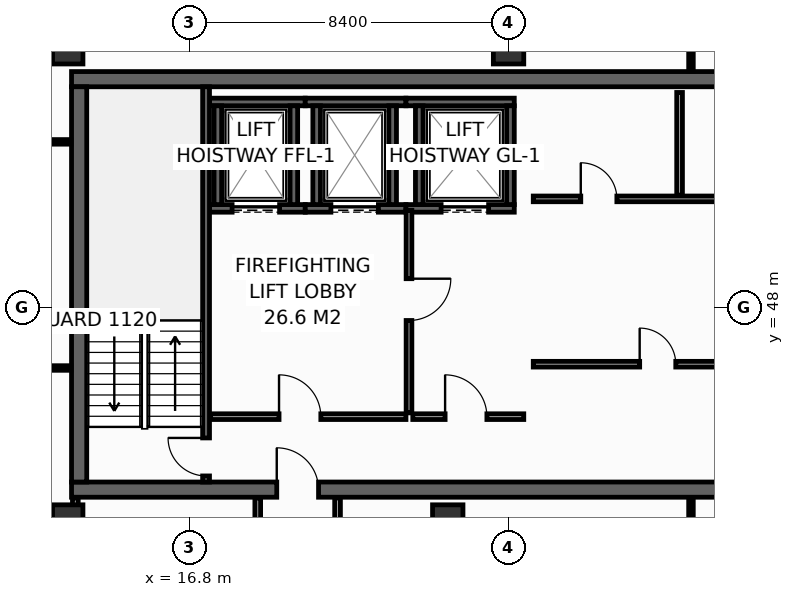
"""IFC4 building model, lengths in metres.
Left out: names, types, materials, properties, quantities, classifications, styles, units other than length and angle.
Written with IfcOpenShell. Run it as: python <this file> out.ifc"""

import sys

from ifc_helpers import new_model, si_unit, direction, frame, frame_2d, origin, origin_2d, place, context, subcontext, project, spatial, rectangle, hollow_rectangle, extrude, element, fill, save


model = new_model("IFC4")
c1 = context("Model", 3, precision=1e-05, world=origin(), true_north=direction((0.0, 1.0)))
c2 = subcontext(c1, "Body", "Model", "MODEL_VIEW")
j1 = project(units=[si_unit("LENGTHUNIT", "METRE"), si_unit("PLANEANGLEUNIT", "RADIAN")], contexts=[c1])
p1 = place(None, origin())
s1 = spatial("IfcSite", under=j1, at=p1, CompositionType="ELEMENT")
p2 = place(p1, origin())
s2 = spatial("IfcBuilding", under=s1, at=p2, CompositionType="ELEMENT")
p3 = place(p2, frame((0.0, 0.0, 230.6)))
s3 = spatial("IfcBuildingStorey", under=s2, at=p3, CompositionType="ELEMENT", Elevation=230.6)
p4 = place(p3, frame((13.7, 43.2, 0.0), z_axis=(0.0, 0.0, 1.0), x_axis=(1.0, 0.0, 0.0)))
e1 = element("IfcWall", 1, at=p4, inside=s3, PredefinedType="SHEAR", context=c2, shape_type="SweptSolid", body=[
    extrude(rectangle(XDim=32.5, YDim=0.4, at=frame_2d((16.25, 0.0))), origin(), (0.0, 0.0, 1.0), 3.55),
])
p5 = place(p4, frame((5.4, 0.0, 0.0)))
e2 = element("IfcOpeningElement", 2, at=p5, cuts=e1, PredefinedType="OPENING", context=c2, shape_type="SweptSolid", body=[
    extrude(rectangle(XDim=1.1, YDim=2.15, at=frame_2d((0.55, 1.075))), frame((0.0, 0.21, 0.0), z_axis=(0.0, -1.0, 0.0), x_axis=(1.0, 0.0, 0.0)), (0.0, 0.0, 1.0), 0.42),
])
p6 = place(p4, frame((25.6, 0.0, 0.0)))
e3 = element("IfcOpeningElement", 3, at=p6, cuts=e1, PredefinedType="OPENING", context=c2, shape_type="SweptSolid", body=[
    extrude(rectangle(XDim=1.1, YDim=2.15, at=frame_2d((0.55, 1.075))), frame((0.0, 0.21, 0.0), z_axis=(0.0, -1.0, 0.0), x_axis=(1.0, 0.0, 0.0)), (0.0, 0.0, 1.0), 0.42),
])
p7 = place(p3, frame((13.7, 54.0, 0.0), z_axis=(0.0, 0.0, 1.0), x_axis=(1.0, 0.0, 0.0)))
e4 = element("IfcWall", 4, at=p7, inside=s3, PredefinedType="SHEAR", context=c2, shape_type="SweptSolid", body=[
    extrude(rectangle(XDim=32.5, YDim=0.4, at=frame_2d((16.25, 0.0))), origin(), (0.0, 0.0, 1.0), 3.55),
])
p8 = place(p3, frame((13.9, 43.4, 0.0), z_axis=(0.0, 0.0, 1.0), x_axis=(0.0, 1.0, 0.0)))
e5 = element("IfcWall", 5, at=p8, inside=s3, PredefinedType="SHEAR", context=c2, shape_type="SweptSolid", body=[
    extrude(rectangle(XDim=10.4, YDim=0.4, at=frame_2d((5.2, 0.0))), origin(), (0.0, 0.0, 1.0), 3.55),
])
for number, where, z_axis, x_axis in (
    (6, (13.6, 54.8, 0.0), (0.0, 0.0, 1.0), (1.0, 0.0, 0.0)),
    (7, (25.2, 54.8, 0.0), (0.0, 0.0, 1.0), (1.0, 0.0, 0.0)),
    (8, (13.6, 42.4, 0.0), (0.0, 0.0, 1.0), (1.0, 0.0, 0.0)),
    (9, (23.6, 42.4, 0.0), (0.0, 0.0, 1.0), (1.0, 0.0, 0.0)),
):
    element("IfcColumn", number, at=place(p3, frame(where, z_axis=z_axis, x_axis=x_axis)), inside=s3, PredefinedType="COLUMN", context=c2, shape_type="SweptSolid", body=[
        extrude(hollow_rectangle(XDim=0.8, YDim=0.8, WallThickness=0.036, at=origin_2d()), origin(), (0.0, 0.0, 1.0), 3.8),
    ])
p9 = place(p3, frame((17.33, 50.6, 0.0), z_axis=(0.0, 0.0, 1.0), x_axis=(1.0, 0.0, 0.0)))
e10 = element("IfcWall", 10, at=p9, inside=s3, PredefinedType="SHEAR", context=c2, shape_type="SweptSolid", body=[
    extrude(rectangle(XDim=2.52, YDim=0.2, at=frame_2d((1.26, 0.0))), origin(), (0.0, 0.0, 1.0), 3.55),
])
p10 = place(p9, frame((0.595, 0.0, 0.0)))
e11 = element("IfcOpeningElement", 11, at=p10, cuts=e10, PredefinedType="OPENING", context=c2, shape_type="SweptSolid", body=[
    extrude(rectangle(XDim=1.25, YDim=2.3, at=frame_2d((0.625, 1.15))), frame((0.0, 0.11, 0.0), z_axis=(0.0, -1.0, 0.0), x_axis=(1.0, 0.0, 0.0)), (0.0, 0.0, 1.0), 0.22),
])
p11 = place(p3, frame((17.33, 53.4, 0.0), z_axis=(0.0, 0.0, 1.0), x_axis=(1.0, 0.0, 0.0)))
e12 = element("IfcWall", 12, at=p11, inside=s3, PredefinedType="SHEAR", context=c2, shape_type="SweptSolid", body=[
    extrude(rectangle(XDim=2.52, YDim=0.2, at=frame_2d((1.26, 0.0))), origin(), (0.0, 0.0, 1.0), 3.55),
])
for number, where, z_axis, x_axis in (
    (13, (17.55, 50.7, 0.0), (0.0, 0.0, 1.0), (0.0, 1.0, 0.0)),
    (14, (19.55, 50.7, 0.0), (0.0, 0.0, 1.0), (0.0, 1.0, 0.0)),
):
    element("IfcWall", number, at=place(p3, frame(where, z_axis=z_axis, x_axis=x_axis)), inside=s3, PredefinedType="SHEAR", context=c2, shape_type="SweptSolid", body=[
        extrude(rectangle(XDim=2.6, YDim=0.2, at=frame_2d((1.3, 0.0))), origin(), (0.0, 0.0, 1.0), 3.55),
    ])
p12 = place(p3, frame((19.85, 50.6, 0.0), z_axis=(0.0, 0.0, 1.0), x_axis=(1.0, 0.0, 0.0)))
e15 = element("IfcWall", 15, at=p12, inside=s3, PredefinedType="SHEAR", context=c2, shape_type="SweptSolid", body=[
    extrude(rectangle(XDim=2.65, YDim=0.2, at=frame_2d((1.325, 0.0))), origin(), (0.0, 0.0, 1.0), 3.55),
])
p13 = place(p12, frame((0.675, 0.0, 0.0)))
e16 = element("IfcOpeningElement", 16, at=p13, cuts=e15, PredefinedType="OPENING", context=c2, shape_type="SweptSolid", body=[
    extrude(rectangle(XDim=1.25, YDim=2.3, at=frame_2d((0.625, 1.15))), frame((0.0, 0.11, 0.0), z_axis=(0.0, -1.0, 0.0), x_axis=(1.0, 0.0, 0.0)), (0.0, 0.0, 1.0), 0.22),
])
p14 = place(p3, frame((19.85, 53.4, 0.0), z_axis=(0.0, 0.0, 1.0), x_axis=(1.0, 0.0, 0.0)))
e17 = element("IfcWall", 17, at=p14, inside=s3, PredefinedType="SHEAR", context=c2, shape_type="SweptSolid", body=[
    extrude(rectangle(XDim=2.65, YDim=0.2, at=frame_2d((1.325, 0.0))), origin(), (0.0, 0.0, 1.0), 3.55),
])
for number, where, z_axis, x_axis in (
    (18, (20.15, 50.7, 0.0), (0.0, 0.0, 1.0), (0.0, 1.0, 0.0)),
    (19, (22.15, 50.7, 0.0), (0.0, 0.0, 1.0), (0.0, 1.0, 0.0)),
):
    element("IfcWall", number, at=place(p3, frame(where, z_axis=z_axis, x_axis=x_axis)), inside=s3, PredefinedType="SHEAR", context=c2, shape_type="SweptSolid", body=[
        extrude(rectangle(XDim=2.6, YDim=0.2, at=frame_2d((1.3, 0.0))), origin(), (0.0, 0.0, 1.0), 3.55),
    ])
p15 = place(p3, frame((22.5, 50.6, 0.0), z_axis=(0.0, 0.0, 1.0), x_axis=(1.0, 0.0, 0.0)))
e20 = element("IfcWall", 20, at=p15, inside=s3, PredefinedType="SHEAR", context=c2, shape_type="SweptSolid", body=[
    extrude(rectangle(XDim=2.85, YDim=0.2, at=frame_2d((1.425, 0.0))), origin(), (0.0, 0.0, 1.0), 3.55),
])
p16 = place(p15, frame((0.925, 0.0, 0.0)))
e21 = element("IfcOpeningElement", 21, at=p16, cuts=e20, PredefinedType="OPENING", context=c2, shape_type="SweptSolid", body=[
    extrude(rectangle(XDim=1.25, YDim=2.3, at=frame_2d((0.625, 1.15))), frame((0.0, 0.11, 0.0), z_axis=(0.0, -1.0, 0.0), x_axis=(1.0, 0.0, 0.0)), (0.0, 0.0, 1.0), 0.22),
])
p17 = place(p3, frame((22.5, 53.4, 0.0), z_axis=(0.0, 0.0, 1.0), x_axis=(1.0, 0.0, 0.0)))
e22 = element("IfcWall", 22, at=p17, inside=s3, PredefinedType="SHEAR", context=c2, shape_type="SweptSolid", body=[
    extrude(rectangle(XDim=2.85, YDim=0.2, at=frame_2d((1.425, 0.0))), origin(), (0.0, 0.0, 1.0), 3.55),
])
for number, where, z_axis, x_axis in (
    (23, (22.85, 50.7, 0.0), (0.0, 0.0, 1.0), (0.0, 1.0, 0.0)),
    (24, (25.25, 50.7, 0.0), (0.0, 0.0, 1.0), (0.0, 1.0, 0.0)),
):
    element("IfcWall", number, at=place(p3, frame(where, z_axis=z_axis, x_axis=x_axis)), inside=s3, PredefinedType="SHEAR", context=c2, shape_type="SweptSolid", body=[
        extrude(rectangle(XDim=2.6, YDim=0.2, at=frame_2d((1.3, 0.0))), origin(), (0.0, 0.0, 1.0), 3.55),
    ])
p18 = place(p3, frame((17.24, 43.4, 0.0), z_axis=(0.0, 0.0, 1.0), x_axis=(0.0, 1.0, 0.0)))
e25 = element("IfcWall", 25, at=p18, inside=s3, PredefinedType="SHEAR", context=c2, shape_type="SweptSolid", body=[
    extrude(rectangle(XDim=10.4, YDim=0.18, at=frame_2d((5.2, 0.0))), origin(), (0.0, 0.0, 1.0), 3.55),
])
p19 = place(p18, frame((0.16, 0.0, 0.0)))
e26 = element("IfcOpeningElement", 26, at=p19, cuts=e25, PredefinedType="OPENING", context=c2, shape_type="SweptSolid", body=[
    extrude(rectangle(XDim=1.0, YDim=2.15, at=frame_2d((0.5, 1.075))), frame((0.0, 0.1, 0.0), z_axis=(0.0, -1.0, 0.0), x_axis=(1.0, 0.0, 0.0)), (0.0, 0.0, 1.0), 0.2),
])
p20 = place(p3, frame((17.36, 45.12, 0.0), z_axis=(0.0, 0.0, 1.0), x_axis=(1.0, 0.0, 0.0)))
e27 = element("IfcWall", 27, at=p20, inside=s3, PredefinedType="PARTITIONING", context=c2, shape_type="SweptSolid", body=[
    extrude(rectangle(XDim=5.14, YDim=0.15, at=frame_2d((2.57, 0.0))), origin(), (0.0, 0.0, 1.0), 3.55),
])
p21 = place(p20, frame((1.8, 0.0, 0.0)))
e28 = element("IfcOpeningElement", 28, at=p21, cuts=e27, PredefinedType="OPENING", context=c2, shape_type="SweptSolid", body=[
    extrude(rectangle(XDim=1.1, YDim=2.15, at=frame_2d((0.55, 1.075))), frame((0.0, 0.085, 0.0), z_axis=(0.0, -1.0, 0.0), x_axis=(1.0, 0.0, 0.0)), (0.0, 0.0, 1.0), 0.17),
])
p22 = place(p3, frame((22.58, 50.55, 0.0), z_axis=(0.0, 0.0, 1.0), x_axis=(0.0, -1.0, 0.0)))
e29 = element("IfcWall", 29, at=p22, inside=s3, PredefinedType="PARTITIONING", context=c2, shape_type="SweptSolid", body=[
    extrude(rectangle(XDim=5.33, YDim=0.15, at=frame_2d((2.665, 0.0))), origin(), (0.0, 0.0, 1.0), 3.55),
])
p23 = place(p22, frame((1.8, 0.0, 0.0)))
e30 = element("IfcOpeningElement", 30, at=p23, cuts=e29, PredefinedType="OPENING", context=c2, shape_type="SweptSolid", body=[
    extrude(rectangle(XDim=1.1, YDim=2.15, at=frame_2d((0.55, 1.075))), frame((0.0, 0.085, 0.0), z_axis=(0.0, -1.0, 0.0), x_axis=(1.0, 0.0, 0.0)), (0.0, 0.0, 1.0), 0.17),
])
p24 = place(p3, frame((22.68, 45.12, 0.0), z_axis=(0.0, 0.0, 1.0), x_axis=(1.0, 0.0, 0.0)))
e31 = element("IfcWall", 31, at=p24, inside=s3, PredefinedType="PARTITIONING", context=c2, shape_type="SweptSolid", body=[
    extrude(rectangle(XDim=2.92, YDim=0.15, at=frame_2d((1.46, 0.0))), origin(), (0.0, 0.0, 1.0), 3.55),
])
p25 = place(p24, frame((0.85, 0.0, 0.0)))
e32 = element("IfcOpeningElement", 32, at=p25, cuts=e31, PredefinedType="OPENING", context=c2, shape_type="SweptSolid", body=[
    extrude(rectangle(XDim=1.1, YDim=2.15, at=frame_2d((0.55, 1.075))), frame((0.0, 0.085, 0.0), z_axis=(0.0, -1.0, 0.0), x_axis=(1.0, 0.0, 0.0)), (0.0, 0.0, 1.0), 0.17),
])
p26 = place(p3, frame((25.85, 50.85, 0.0), z_axis=(0.0, 0.0, 1.0), x_axis=(1.0, 0.0, 0.0)))
e33 = element("IfcWall", 33, at=p26, inside=s3, PredefinedType="PARTITIONING", context=c2, shape_type="SweptSolid", body=[
    extrude(rectangle(XDim=7.65, YDim=0.15, at=frame_2d((3.825, 0.0))), origin(), (0.0, 0.0, 1.0), 3.55),
])
p27 = place(p26, frame((1.25, 0.0, 0.0)))
e34 = element("IfcOpeningElement", 34, at=p27, cuts=e33, PredefinedType="OPENING", context=c2, shape_type="SweptSolid", body=[
    extrude(rectangle(XDim=0.95, YDim=2.15, at=frame_2d((0.475, 1.075))), frame((0.0, 0.085, 0.0), z_axis=(0.0, -1.0, 0.0), x_axis=(1.0, 0.0, 0.0)), (0.0, 0.0, 1.0), 0.17),
])
p28 = place(p26, frame((5.05, 0.0, 0.0)))
e35 = element("IfcOpeningElement", 35, at=p28, cuts=e33, PredefinedType="OPENING", context=c2, shape_type="SweptSolid", body=[
    extrude(rectangle(XDim=0.95, YDim=2.15, at=frame_2d((0.475, 1.075))), frame((0.0, 0.085, 0.0), z_axis=(0.0, -1.0, 0.0), x_axis=(1.0, 0.0, 0.0)), (0.0, 0.0, 1.0), 0.17),
])
p29 = place(p3, frame((29.7, 50.95, 0.0), z_axis=(0.0, 0.0, 1.0), x_axis=(0.0, 1.0, 0.0)))
e36 = element("IfcWall", 36, at=p29, inside=s3, PredefinedType="PARTITIONING", context=c2, shape_type="SweptSolid", body=[
    extrude(rectangle(XDim=2.7, YDim=0.15, at=frame_2d((1.35, 0.0))), origin(), (0.0, 0.0, 1.0), 3.55),
])
p30 = place(p3, frame((25.85, 46.5, 0.0), z_axis=(0.0, 0.0, 1.0), x_axis=(1.0, 0.0, 0.0)))
e37 = element("IfcWall", 37, at=p30, inside=s3, PredefinedType="PARTITIONING", context=c2, shape_type="SweptSolid", body=[
    extrude(rectangle(XDim=7.65, YDim=0.15, at=frame_2d((3.825, 0.0))), origin(), (0.0, 0.0, 1.0), 3.55),
])
p31 = place(p30, frame((2.8, 0.0, 0.0)))
e38 = element("IfcOpeningElement", 38, at=p31, cuts=e37, PredefinedType="OPENING", context=c2, shape_type="SweptSolid", body=[
    extrude(rectangle(XDim=0.95, YDim=2.15, at=frame_2d((0.475, 1.075))), frame((0.0, 0.085, 0.0), z_axis=(0.0, -1.0, 0.0), x_axis=(1.0, 0.0, 0.0)), (0.0, 0.0, 1.0), 0.17),
])
p32 = place(p3, frame((11.55, 52.35, 0.0), z_axis=(0.0, 0.0, 1.0), x_axis=(1.0, 0.0, 0.0)))
e39 = element("IfcWall", 39, at=p32, inside=s3, PredefinedType="PARTITIONING", context=c2, shape_type="SweptSolid", body=[
    extrude(rectangle(XDim=2.13, YDim=0.12, at=frame_2d((1.065, 0.0))), origin(), (0.0, 0.0, 1.0), 3.55),
])
p33 = place(p3, frame((30.0, 54.22, 0.0), z_axis=(0.0, 0.0, 1.0), x_axis=(0.0, 1.0, 0.0)))
e40 = element("IfcWall", 40, at=p33, inside=s3, PredefinedType="PARTITIONING", context=c2, shape_type="SweptSolid", body=[
    extrude(rectangle(XDim=1.775, YDim=0.12, at=frame_2d((0.888, 0.0))), origin(), (0.0, 0.0, 1.0), 2.935),
])
p34 = place(p3, frame((11.55, 46.4, 0.0), z_axis=(0.0, 0.0, 1.0), x_axis=(1.0, 0.0, 0.0)))
e41 = element("IfcWall", 41, at=p34, inside=s3, PredefinedType="PARTITIONING", context=c2, shape_type="SweptSolid", body=[
    extrude(rectangle(XDim=2.13, YDim=0.12, at=frame_2d((1.065, 0.0))), origin(), (0.0, 0.0, 1.0), 3.55),
])
p35 = place(p3, frame((13.8, 41.03, 0.0), z_axis=(0.0, 0.0, 1.0), x_axis=(0.0, 1.0, 0.0)))
e42 = element("IfcWall", 42, at=p35, inside=s3, PredefinedType="PARTITIONING", context=c2, shape_type="SweptSolid", body=[
    extrude(rectangle(XDim=1.95, YDim=0.15, at=frame_2d((0.975, 0.0))), origin(), (0.0, 0.0, 1.0), 3.55),
])
for number, where, z_axis, x_axis in (
    (43, (18.6, 40.95, 0.0), (0.0, 0.0, 1.0), (0.0, 1.0, 0.0)),
    (44, (20.7, 40.95, 0.0), (0.0, 0.0, 1.0), (0.0, 1.0, 0.0)),
):
    element("IfcWall", number, at=place(p3, frame(where, z_axis=z_axis, x_axis=x_axis)), inside=s3, PredefinedType="PARTITIONING", context=c2, shape_type="SweptSolid", body=[
        extrude(rectangle(XDim=2.03, YDim=0.15, at=frame_2d((1.015, 0.0))), origin(), (0.0, 0.0, 1.0), 3.55),
    ])
p36 = place(p3, frame((30.0, 40.95, 0.0), z_axis=(0.0, 0.0, 1.0), x_axis=(0.0, 1.0, 0.0)))
e45 = element("IfcWall", 45, at=p36, inside=s3, PredefinedType="PARTITIONING", context=c2, shape_type="SweptSolid", body=[
    extrude(rectangle(XDim=2.03, YDim=0.12, at=frame_2d((1.015, 0.0))), origin(), (0.0, 0.0, 1.0), 2.947),
])
p37 = place(p10, origin())
e46 = element("IfcDoor", 46, at=p37, inside=s3, OperationType="SLIDING_TO_LEFT", PredefinedType="DOOR", context=c2, shape_type="SweptSolid", body=[
    extrude(rectangle(XDim=1.25, YDim=2.3, at=frame_2d((0.625, 1.15))), frame((0.0, 0.025, 0.0), z_axis=(0.0, -1.0, 0.0), x_axis=(1.0, 0.0, 0.0)), (0.0, 0.0, 1.0), 0.05),
])
fill(e11, e46)
p38 = place(p13, origin())
e47 = element("IfcDoor", 47, at=p38, inside=s3, OperationType="SLIDING_TO_LEFT", PredefinedType="DOOR", context=c2, shape_type="SweptSolid", body=[
    extrude(rectangle(XDim=1.25, YDim=2.3, at=frame_2d((0.625, 1.15))), frame((0.0, 0.025, 0.0), z_axis=(0.0, -1.0, 0.0), x_axis=(1.0, 0.0, 0.0)), (0.0, 0.0, 1.0), 0.05),
])
fill(e16, e47)
p39 = place(p16, origin())
e48 = element("IfcDoor", 48, at=p39, inside=s3, OperationType="SLIDING_TO_LEFT", PredefinedType="DOOR", context=c2, shape_type="SweptSolid", body=[
    extrude(rectangle(XDim=1.25, YDim=2.3, at=frame_2d((0.625, 1.15))), frame((0.0, 0.025, 0.0), z_axis=(0.0, -1.0, 0.0), x_axis=(1.0, 0.0, 0.0)), (0.0, 0.0, 1.0), 0.05),
])
fill(e21, e48)
p40 = place(p19, origin())
e49 = element("IfcDoor", 49, at=p40, inside=s3, OperationType="SINGLE_SWING_RIGHT", PredefinedType="DOOR", context=c2, shape_type="SweptSolid", body=[
    extrude(rectangle(XDim=1.0, YDim=2.15, at=frame_2d((0.5, 1.075))), frame((0.0, 0.025, 0.0), z_axis=(0.0, -1.0, 0.0), x_axis=(1.0, 0.0, 0.0)), (0.0, 0.0, 1.0), 0.05),
])
fill(e26, e49)
p41 = place(p21, origin())
e50 = element("IfcDoor", 50, at=p41, inside=s3, OperationType="SINGLE_SWING_LEFT", PredefinedType="DOOR", context=c2, shape_type="SweptSolid", body=[
    extrude(rectangle(XDim=1.1, YDim=2.15, at=frame_2d((0.55, 1.075))), frame((0.0, 0.025, 0.0), z_axis=(0.0, -1.0, 0.0), x_axis=(1.0, 0.0, 0.0)), (0.0, 0.0, 1.0), 0.05),
])
fill(e28, e50)
p42 = place(p23, origin())
e51 = element("IfcDoor", 51, at=p42, inside=s3, OperationType="SINGLE_SWING_LEFT", PredefinedType="DOOR", context=c2, shape_type="SweptSolid", body=[
    extrude(rectangle(XDim=1.1, YDim=2.15, at=frame_2d((0.55, 1.075))), frame((0.0, 0.025, 0.0), z_axis=(0.0, -1.0, 0.0), x_axis=(1.0, 0.0, 0.0)), (0.0, 0.0, 1.0), 0.05),
])
fill(e30, e51)
p43 = place(p25, origin())
e52 = element("IfcDoor", 52, at=p43, inside=s3, OperationType="SINGLE_SWING_LEFT", PredefinedType="DOOR", context=c2, shape_type="SweptSolid", body=[
    extrude(rectangle(XDim=1.1, YDim=2.15, at=frame_2d((0.55, 1.075))), frame((0.0, 0.025, 0.0), z_axis=(0.0, -1.0, 0.0), x_axis=(1.0, 0.0, 0.0)), (0.0, 0.0, 1.0), 0.05),
])
fill(e32, e52)
p44 = place(p5, origin())
e53 = element("IfcDoor", 53, at=p44, inside=s3, OperationType="SINGLE_SWING_LEFT", PredefinedType="DOOR", context=c2, shape_type="SweptSolid", body=[
    extrude(rectangle(XDim=1.1, YDim=2.15, at=frame_2d((0.55, 1.075))), frame((0.0, 0.025, 0.0), z_axis=(0.0, -1.0, 0.0), x_axis=(1.0, 0.0, 0.0)), (0.0, 0.0, 1.0), 0.05),
])
fill(e2, e53)
p45 = place(p27, origin())
e54 = element("IfcDoor", 54, at=p45, inside=s3, OperationType="SINGLE_SWING_LEFT", PredefinedType="DOOR", context=c2, shape_type="SweptSolid", body=[
    extrude(rectangle(XDim=0.95, YDim=2.15, at=frame_2d((0.475, 1.075))), frame((0.0, 0.025, 0.0), z_axis=(0.0, -1.0, 0.0), x_axis=(1.0, 0.0, 0.0)), (0.0, 0.0, 1.0), 0.05),
])
fill(e34, e54)
p46 = place(p31, origin())
e55 = element("IfcDoor", 55, at=p46, inside=s3, OperationType="SINGLE_SWING_LEFT", PredefinedType="DOOR", context=c2, shape_type="SweptSolid", body=[
    extrude(rectangle(XDim=0.95, YDim=2.15, at=frame_2d((0.475, 1.075))), frame((0.0, 0.025, 0.0), z_axis=(0.0, -1.0, 0.0), x_axis=(1.0, 0.0, 0.0)), (0.0, 0.0, 1.0), 0.05),
])
fill(e38, e55)
save(model, sys.argv[1])
